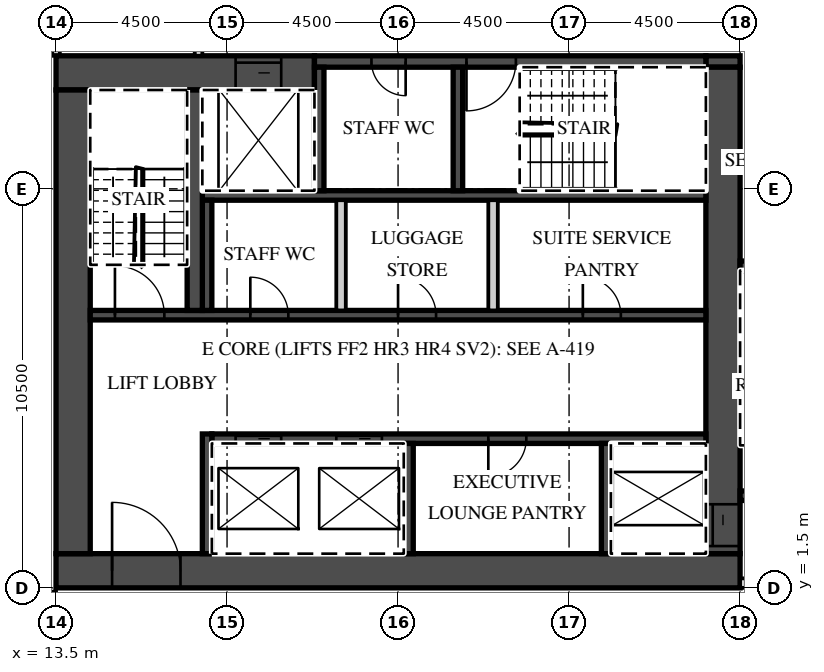
"""IFC4 building model, lengths in metres.
Left out: names, types, materials, properties, quantities, classifications, styles, units other than length and angle.
Written with IfcOpenShell. Run it as: python <this file> out.ifc"""

import sys

from ifc_helpers import new_model, si_unit, direction, frame, frame_2d, origin, place, context, subcontext, project, spatial, rectangle, extrude, element, fill, save


model = new_model("IFC4")
c1 = context("Model", 3, precision=1e-05, world=origin(), true_north=direction((0.0, 1.0)))
c2 = subcontext(c1, "Body", "Model", "MODEL_VIEW")
j1 = project(units=[si_unit("LENGTHUNIT", "METRE"), si_unit("PLANEANGLEUNIT", "RADIAN")], contexts=[c1])
p1 = place(None, origin())
s1 = spatial("IfcSite", under=j1, at=p1, CompositionType="ELEMENT")
p2 = place(p1, origin())
s2 = spatial("IfcBuilding", under=s1, at=p2, CompositionType="ELEMENT")
p3 = place(p2, frame((0.0, 0.0, 304.8)))
s3 = spatial("IfcBuildingStorey", under=s2, at=p3, CompositionType="ELEMENT", Elevation=304.8)
p4 = place(p3, frame((13.5, 15.5, 0.0), z_axis=(0.0, 0.0, 1.0), x_axis=(0.0, 1.0, 0.0)))
e1 = element("IfcWall", 1, at=p4, inside=s3, PredefinedType="PARTITIONING", context=c2, shape_type="SweptSolid", body=[
    extrude(rectangle(XDim=4.985, YDim=0.2, at=frame_2d((2.493, 0.0))), origin(), (0.0, 0.0, 1.0), 2.9),
])
p5 = place(p3, frame((-39.909, 1.3, 0.0), z_axis=(0.0, 0.0, 1.0), x_axis=(1.0, 0.0, 0.0)))
e2 = element("IfcWall", 2, at=p5, inside=s3, PredefinedType="PARTITIONING", context=c2, shape_type="SweptSolid", body=[
    extrude(rectangle(XDim=53.409, YDim=0.2, at=frame_2d((26.705, 0.0))), origin(), (0.0, 0.0, 1.0), 2.9),
])
p6 = place(p5, frame((0.15, 0.0, 0.0)))
e3 = element("IfcOpeningElement", 3, at=p6, cuts=e2, PredefinedType="OPENING", context=c2, shape_type="SweptSolid", body=[
    extrude(rectangle(XDim=0.9, YDim=2.1, at=frame_2d((0.45, 1.05))), frame((0.0, 0.11, 0.0), z_axis=(0.0, -1.0, 0.0), x_axis=(1.0, 0.0, 0.0)), (0.0, 0.0, 1.0), 0.22),
])
p7 = place(p5, frame((9.271, 0.0, 0.0)))
e4 = element("IfcOpeningElement", 4, at=p7, cuts=e2, PredefinedType="OPENING", context=c2, shape_type="SweptSolid", body=[
    extrude(rectangle(XDim=1.2, YDim=2.1, at=frame_2d((0.6, 1.05))), frame((0.0, 0.11, 0.0), z_axis=(0.0, -1.0, 0.0), x_axis=(1.0, 0.0, 0.0)), (0.0, 0.0, 1.0), 0.22),
])
p8 = place(p5, frame((13.484, 0.0, 0.0)))
e5 = element("IfcOpeningElement", 5, at=p8, cuts=e2, PredefinedType="OPENING", context=c2, shape_type="SweptSolid", body=[
    extrude(rectangle(XDim=1.0, YDim=2.1, at=frame_2d((0.5, 1.05))), frame((0.0, 0.11, 0.0), z_axis=(0.0, -1.0, 0.0), x_axis=(1.0, 0.0, 0.0)), (0.0, 0.0, 1.0), 0.22),
])
p9 = place(p5, frame((17.959, 0.0, 0.0)))
e6 = element("IfcOpeningElement", 6, at=p9, cuts=e2, PredefinedType="OPENING", context=c2, shape_type="SweptSolid", body=[
    extrude(rectangle(XDim=1.0, YDim=2.1, at=frame_2d((0.5, 1.05))), frame((0.0, 0.11, 0.0), z_axis=(0.0, -1.0, 0.0), x_axis=(1.0, 0.0, 0.0)), (0.0, 0.0, 1.0), 0.22),
])
p10 = place(p5, frame((24.859, 0.0, 0.0)))
e7 = element("IfcOpeningElement", 7, at=p10, cuts=e2, PredefinedType="OPENING", context=c2, shape_type="SweptSolid", body=[
    extrude(rectangle(XDim=1.0, YDim=2.1, at=frame_2d((0.5, 1.05))), frame((0.0, 0.11, 0.0), z_axis=(0.0, -1.0, 0.0), x_axis=(1.0, 0.0, 0.0)), (0.0, 0.0, 1.0), 0.22),
])
p11 = place(p5, frame((29.334, 0.0, 0.0)))
e8 = element("IfcOpeningElement", 8, at=p11, cuts=e2, PredefinedType="OPENING", context=c2, shape_type="SweptSolid", body=[
    extrude(rectangle(XDim=1.0, YDim=2.1, at=frame_2d((0.5, 1.05))), frame((0.0, 0.11, 0.0), z_axis=(0.0, -1.0, 0.0), x_axis=(1.0, 0.0, 0.0)), (0.0, 0.0, 1.0), 0.22),
])
p12 = place(p5, frame((36.271, 0.0, 0.0)))
e9 = element("IfcOpeningElement", 9, at=p12, cuts=e2, PredefinedType="OPENING", context=c2, shape_type="SweptSolid", body=[
    extrude(rectangle(XDim=1.2, YDim=2.1, at=frame_2d((0.6, 1.05))), frame((0.0, 0.11, 0.0), z_axis=(0.0, -1.0, 0.0), x_axis=(1.0, 0.0, 0.0)), (0.0, 0.0, 1.0), 0.22),
])
p13 = place(p5, frame((40.484, 0.0, 0.0)))
e10 = element("IfcOpeningElement", 10, at=p13, cuts=e2, PredefinedType="OPENING", context=c2, shape_type="SweptSolid", body=[
    extrude(rectangle(XDim=1.0, YDim=2.1, at=frame_2d((0.5, 1.05))), frame((0.0, 0.11, 0.0), z_axis=(0.0, -1.0, 0.0), x_axis=(1.0, 0.0, 0.0)), (0.0, 0.0, 1.0), 0.22),
])
p14 = place(p5, frame((47.334, 0.0, 0.0)))
e11 = element("IfcOpeningElement", 11, at=p14, cuts=e2, PredefinedType="OPENING", context=c2, shape_type="SweptSolid", body=[
    extrude(rectangle(XDim=1.0, YDim=2.1, at=frame_2d((0.5, 1.05))), frame((0.0, 0.11, 0.0), z_axis=(0.0, -1.0, 0.0), x_axis=(1.0, 0.0, 0.0)), (0.0, 0.0, 1.0), 0.22),
])
p15 = place(p5, frame((51.834, 0.0, 0.0)))
e12 = element("IfcOpeningElement", 12, at=p15, cuts=e2, PredefinedType="OPENING", context=c2, shape_type="SweptSolid", body=[
    extrude(rectangle(XDim=1.0, YDim=2.1, at=frame_2d((0.5, 1.05))), frame((0.0, 0.11, 0.0), z_axis=(0.0, -1.0, 0.0), x_axis=(1.0, 0.0, 0.0)), (0.0, 0.0, 1.0), 0.22),
])
p16 = place(p3, frame((13.5, 1.95, 0.0), z_axis=(0.0, 0.0, 1.0), x_axis=(1.0, 0.0, 0.0)))
e13 = element("IfcWall", 13, at=p16, inside=s3, PredefinedType="SHEAR", context=c2, shape_type="SweptSolid", body=[
    extrude(rectangle(XDim=18.0, YDim=0.9, at=frame_2d((9.0, 0.0))), origin(), (0.0, 0.0, 1.0), 2.9),
])
p17 = place(p16, frame((1.475, 0.0, 0.0)))
e14 = element("IfcOpeningElement", 14, at=p17, cuts=e13, PredefinedType="OPENING", context=c2, shape_type="SweptSolid", body=[
    extrude(rectangle(XDim=1.8, YDim=2.1, at=frame_2d((0.9, 1.05))), frame((0.0, 0.46, 0.0), z_axis=(0.0, -1.0, 0.0), x_axis=(1.0, 0.0, 0.0)), (0.0, 0.0, 1.0), 0.92),
])
p18 = place(p3, frame((13.5, 15.05, 0.0), z_axis=(0.0, 0.0, 1.0), x_axis=(1.0, 0.0, 0.0)))
e15 = element("IfcWall", 15, at=p18, inside=s3, PredefinedType="SHEAR", context=c2, shape_type="SweptSolid", body=[
    extrude(rectangle(XDim=6.8, YDim=0.9, at=frame_2d((3.4, 0.0))), origin(), (0.0, 0.0, 1.0), 2.9),
])
p19 = place(p18, frame((4.725, 0.0, 0.0)))
e16 = element("IfcOpeningElement", 16, at=p19, cuts=e15, PredefinedType="OPENING", context=c2, shape_type="SweptSolid", body=[
    extrude(rectangle(XDim=1.2, YDim=2.1, at=frame_2d((0.6, 1.05))), frame((0.0, 0.46, 0.0), z_axis=(0.0, -1.0, 0.0), x_axis=(1.0, 0.0, 0.0)), (0.0, 0.0, 1.0), 0.92),
])
p20 = place(p3, frame((30.6, 15.35, 0.0), z_axis=(0.0, 0.0, 1.0), x_axis=(1.0, 0.0, 0.0)))
e17 = element("IfcWall", 17, at=p20, inside=s3, PredefinedType="SHEAR", context=c2, shape_type="SweptSolid", body=[
    extrude(rectangle(XDim=0.9, YDim=0.3, at=frame_2d((0.45, 0.0))), origin(), (0.0, 0.0, 1.0), 2.9),
])
p21 = place(p3, frame((20.3, 15.35, 0.0), z_axis=(0.0, 0.0, 1.0), x_axis=(1.0, 0.0, 0.0)))
e18 = element("IfcWall", 18, at=p21, inside=s3, PredefinedType="SHEAR", context=c2, shape_type="SweptSolid", body=[
    extrude(rectangle(XDim=10.3, YDim=0.3, at=frame_2d((5.15, 0.0))), origin(), (0.0, 0.0, 1.0), 2.9),
])
p22 = place(p21, frame((4.0, 0.0, 0.0)))
e19 = element("IfcOpeningElement", 19, at=p22, cuts=e18, PredefinedType="OPENING", context=c2, shape_type="SweptSolid", body=[
    extrude(rectangle(XDim=1.3, YDim=2.1, at=frame_2d((0.65, 1.05))), frame((0.0, 0.16, 0.0), z_axis=(0.0, -1.0, 0.0), x_axis=(1.0, 0.0, 0.0)), (0.0, 0.0, 1.0), 0.32),
])
p23 = place(p21, frame((1.5, 0.0, 0.0)))
e20 = element("IfcOpeningElement", 20, at=p23, cuts=e18, PredefinedType="OPENING", context=c2, shape_type="SweptSolid", body=[
    extrude(rectangle(XDim=0.9, YDim=2.1, at=frame_2d((0.45, 1.05))), frame((0.0, 0.16, 0.0), z_axis=(0.0, -1.0, 0.0), x_axis=(1.0, 0.0, 0.0)), (0.0, 0.0, 1.0), 0.32),
])
p24 = place(p3, frame((31.05, 2.4, 0.0), z_axis=(0.0, 0.0, 1.0), x_axis=(0.0, 1.0, 0.0)))
e21 = element("IfcWall", 21, at=p24, inside=s3, PredefinedType="SHEAR", context=c2, shape_type="SweptSolid", body=[
    extrude(rectangle(XDim=12.8, YDim=0.9, at=frame_2d((6.4, 0.0))), origin(), (0.0, 0.0, 1.0), 2.9),
])
p25 = place(p24, frame((0.2, 0.0, 0.0)))
e22 = element("IfcOpeningElement", 22, at=p25, cuts=e21, PredefinedType="OPENING", context=c2, shape_type="SweptSolid", body=[
    extrude(rectangle(XDim=1.1, YDim=2.1, at=frame_2d((0.55, 1.05))), frame((0.0, 0.46, 0.0), z_axis=(0.0, -1.0, 0.0), x_axis=(1.0, 0.0, 0.0)), (0.0, 0.0, 1.0), 0.92),
])
p26 = place(p3, frame((13.95, 2.4, 0.0), z_axis=(0.0, 0.0, 1.0), x_axis=(0.0, 1.0, 0.0)))
e23 = element("IfcWall", 23, at=p26, inside=s3, PredefinedType="SHEAR", context=c2, shape_type="SweptSolid", body=[
    extrude(rectangle(XDim=12.2, YDim=0.9, at=frame_2d((6.1, 0.0))), origin(), (0.0, 0.0, 1.0), 2.9),
])
p27 = place(p3, frame((17.6, 5.425, 0.0), z_axis=(0.0, 0.0, 1.0), x_axis=(1.0, 0.0, 0.0)))
e24 = element("IfcWall", 24, at=p27, inside=s3, PredefinedType="SHEAR", context=c2, shape_type="SweptSolid", body=[
    extrude(rectangle(XDim=13.0, YDim=0.25, at=frame_2d((6.5, 0.0))), origin(), (0.0, 0.0, 1.0), 2.9),
])
p28 = place(p27, frame((3.275, 0.0, 0.0)))
e25 = element("IfcOpeningElement", 25, at=p28, cuts=e24, PredefinedType="OPENING", context=c2, shape_type="SweptSolid", body=[
    extrude(rectangle(XDim=1.2, YDim=2.1, at=frame_2d((0.6, 1.05))), frame((0.0, 0.135, 0.0), z_axis=(0.0, -1.0, 0.0), x_axis=(1.0, 0.0, 0.0)), (0.0, 0.0, 1.0), 0.27),
])
p29 = place(p27, frame((0.625, 0.0, 0.0)))
e26 = element("IfcOpeningElement", 26, at=p29, cuts=e24, PredefinedType="OPENING", context=c2, shape_type="SweptSolid", body=[
    extrude(rectangle(XDim=1.2, YDim=2.1, at=frame_2d((0.6, 1.05))), frame((0.0, 0.135, 0.0), z_axis=(0.0, -1.0, 0.0), x_axis=(1.0, 0.0, 0.0)), (0.0, 0.0, 1.0), 0.27),
])
p30 = place(p27, frame((7.275, 0.0, 0.0)))
e27 = element("IfcOpeningElement", 27, at=p30, cuts=e24, PredefinedType="OPENING", context=c2, shape_type="SweptSolid", body=[
    extrude(rectangle(XDim=1.0, YDim=2.1, at=frame_2d((0.5, 1.05))), frame((0.0, 0.135, 0.0), z_axis=(0.0, -1.0, 0.0), x_axis=(1.0, 0.0, 0.0)), (0.0, 0.0, 1.0), 0.27),
])
p31 = place(p3, frame((17.475, 2.4, 0.0), z_axis=(0.0, 0.0, 1.0), x_axis=(0.0, 1.0, 0.0)))
e28 = element("IfcWall", 28, at=p31, inside=s3, PredefinedType="SHEAR", context=c2, shape_type="SweptSolid", body=[
    extrude(rectangle(XDim=3.15, YDim=0.25, at=frame_2d((1.575, 0.0))), origin(), (0.0, 0.0, 1.0), 2.9),
])
for number, where, z_axis, x_axis in (
    (29, (27.975, 2.4, 0.0), (0.0, 0.0, 1.0), (0.0, 1.0, 0.0)),
    (30, (22.775, 2.4, 0.0), (0.0, 0.0, 1.0), (0.0, 1.0, 0.0)),
):
    element("IfcWall", number, at=place(p3, frame(where, z_axis=z_axis, x_axis=x_axis)), inside=s3, PredefinedType="SHEAR", context=c2, shape_type="SweptSolid", body=[
        extrude(rectangle(XDim=2.9, YDim=0.25, at=frame_2d((1.45, 0.0))), origin(), (0.0, 0.0, 1.0), 2.9),
    ])
p32 = place(p3, frame((14.4, 8.675, 0.0), z_axis=(0.0, 0.0, 1.0), x_axis=(1.0, 0.0, 0.0)))
e31 = element("IfcWall", 31, at=p32, inside=s3, PredefinedType="SHEAR", context=c2, shape_type="SweptSolid", body=[
    extrude(rectangle(XDim=16.2, YDim=0.25, at=frame_2d((8.1, 0.0))), origin(), (0.0, 0.0, 1.0), 2.9),
])
p33 = place(p32, frame((0.65, 0.0, 0.0)))
e32 = element("IfcOpeningElement", 32, at=p33, cuts=e31, PredefinedType="OPENING", context=c2, shape_type="SweptSolid", body=[
    extrude(rectangle(XDim=1.3, YDim=2.1, at=frame_2d((0.65, 1.05))), frame((0.0, 0.135, 0.0), z_axis=(0.0, -1.0, 0.0), x_axis=(1.0, 0.0, 0.0)), (0.0, 0.0, 1.0), 0.27),
])
p34 = place(p32, frame((12.962, 0.0, 0.0)))
e33 = element("IfcOpeningElement", 33, at=p34, cuts=e31, PredefinedType="OPENING", context=c2, shape_type="SweptSolid", body=[
    extrude(rectangle(XDim=1.0, YDim=2.1, at=frame_2d((0.5, 1.05))), frame((0.0, 0.135, 0.0), z_axis=(0.0, -1.0, 0.0), x_axis=(1.0, 0.0, 0.0)), (0.0, 0.0, 1.0), 0.27),
])
p35 = place(p32, frame((8.1, 0.0, 0.0)))
e34 = element("IfcOpeningElement", 34, at=p35, cuts=e31, PredefinedType="OPENING", context=c2, shape_type="SweptSolid", body=[
    extrude(rectangle(XDim=1.0, YDim=2.1, at=frame_2d((0.5, 1.05))), frame((0.0, 0.135, 0.0), z_axis=(0.0, -1.0, 0.0), x_axis=(1.0, 0.0, 0.0)), (0.0, 0.0, 1.0), 0.27),
])
p36 = place(p32, frame((4.212, 0.0, 0.0)))
e35 = element("IfcOpeningElement", 35, at=p36, cuts=e31, PredefinedType="OPENING", context=c2, shape_type="SweptSolid", body=[
    extrude(rectangle(XDim=1.0, YDim=2.1, at=frame_2d((0.5, 1.05))), frame((0.0, 0.135, 0.0), z_axis=(0.0, -1.0, 0.0), x_axis=(1.0, 0.0, 0.0)), (0.0, 0.0, 1.0), 0.27),
])
p37 = place(p3, frame((17.35, 11.825, 0.0), z_axis=(0.0, 0.0, 1.0), x_axis=(1.0, 0.0, 0.0)))
e36 = element("IfcWall", 36, at=p37, inside=s3, PredefinedType="SHEAR", context=c2, shape_type="SweptSolid", body=[
    extrude(rectangle(XDim=13.25, YDim=0.25, at=frame_2d((6.625, 0.0))), origin(), (0.0, 0.0, 1.0), 2.9),
])
p38 = place(p3, frame((17.475, 8.8, 0.0), z_axis=(0.0, 0.0, 1.0), x_axis=(0.0, 1.0, 0.0)))
e37 = element("IfcWall", 37, at=p38, inside=s3, PredefinedType="SHEAR", context=c2, shape_type="SweptSolid", body=[
    extrude(rectangle(XDim=2.9, YDim=0.25, at=frame_2d((1.45, 0.0))), origin(), (0.0, 0.0, 1.0), 2.9),
])
for number, where, z_axis, x_axis in (
    (38, (25.0, 8.8, 0.0), (0.0, 0.0, 1.0), (0.0, 1.0, 0.0)),
    (39, (21.0, 8.8, 0.0), (0.0, 0.0, 1.0), (0.0, 1.0, 0.0)),
):
    element("IfcWall", number, at=place(p3, frame(where, z_axis=z_axis, x_axis=x_axis)), inside=s3, PredefinedType="PARTITIONING", context=c2, shape_type="SweptSolid", body=[
        extrude(rectangle(XDim=2.9, YDim=0.25, at=frame_2d((1.45, 0.0))), origin(), (0.0, 0.0, 1.0), 2.9),
    ])
p39 = place(p3, frame((17.15, 8.8, 0.0), z_axis=(0.0, 0.0, 1.0), x_axis=(0.0, 1.0, 0.0)))
e40 = element("IfcWall", 40, at=p39, inside=s3, PredefinedType="SHEAR", context=c2, shape_type="SweptSolid", body=[
    extrude(rectangle(XDim=5.8, YDim=0.4, at=frame_2d((2.9, 0.0))), origin(), (0.0, 0.0, 1.0), 2.9),
])
for number, where, z_axis, x_axis in (
    (41, (20.425, 11.95, 0.0), (0.0, 0.0, 1.0), (0.0, 1.0, 0.0)),
    (42, (24.075, 11.95, 0.0), (0.0, 0.0, 1.0), (0.0, 1.0, 0.0)),
):
    element("IfcWall", number, at=place(p3, frame(where, z_axis=z_axis, x_axis=x_axis)), inside=s3, PredefinedType="SHEAR", context=c2, shape_type="SweptSolid", body=[
        extrude(rectangle(XDim=3.25, YDim=0.25, at=frame_2d((1.625, 0.0))), origin(), (0.0, 0.0, 1.0), 2.9),
    ])
p40 = place(p3, frame((31.5, 1.625, 0.0), z_axis=(0.0, 0.0, 1.0), x_axis=(1.0, 0.0, 0.0)))
e43 = element("IfcWall", 43, at=p40, inside=s3, PredefinedType="PARTITIONING", context=c2, shape_type="SweptSolid", body=[
    extrude(rectangle(XDim=5.012, YDim=0.25, at=frame_2d((2.506, 0.0))), origin(), (0.0, 0.0, 1.0), 2.9),
])
p41 = place(p40, frame((0.625, 0.0, 0.0)))
e44 = element("IfcOpeningElement", 44, at=p41, cuts=e43, PredefinedType="OPENING", context=c2, shape_type="SweptSolid", body=[
    extrude(rectangle(XDim=1.3, YDim=2.1, at=frame_2d((0.65, 1.05))), frame((0.0, 0.135, 0.0), z_axis=(0.0, -1.0, 0.0), x_axis=(1.0, 0.0, 0.0)), (0.0, 0.0, 1.0), 0.27),
])
p42 = place(p40, frame((3.25, 0.0, 0.0)))
e45 = element("IfcOpeningElement", 45, at=p42, cuts=e43, PredefinedType="OPENING", context=c2, shape_type="SweptSolid", body=[
    extrude(rectangle(XDim=1.1, YDim=2.1, at=frame_2d((0.55, 1.05))), frame((0.0, 0.135, 0.0), z_axis=(0.0, -1.0, 0.0), x_axis=(1.0, 0.0, 0.0)), (0.0, 0.0, 1.0), 0.27),
])
p43 = place(p3, frame((31.5, 3.925, 0.0), z_axis=(0.0, 0.0, 1.0), x_axis=(1.0, 0.0, 0.0)))
e46 = element("IfcWall", 46, at=p43, inside=s3, PredefinedType="SHEAR", context=c2, shape_type="SweptSolid", body=[
    extrude(rectangle(XDim=2.55, YDim=0.25, at=frame_2d((1.275, 0.0))), origin(), (0.0, 0.0, 1.0), 2.9),
])
p44 = place(p43, frame((0.625, 0.0, 0.0)))
e47 = element("IfcOpeningElement", 47, at=p44, cuts=e46, PredefinedType="OPENING", context=c2, shape_type="SweptSolid", body=[
    extrude(rectangle(XDim=1.3, YDim=2.1, at=frame_2d((0.65, 1.05))), frame((0.0, 0.135, 0.0), z_axis=(0.0, -1.0, 0.0), x_axis=(1.0, 0.0, 0.0)), (0.0, 0.0, 1.0), 0.27),
])
p45 = place(p3, frame((31.5, 9.975, 0.0), z_axis=(0.0, 0.0, 1.0), x_axis=(1.0, 0.0, 0.0)))
e48 = element("IfcWall", 48, at=p45, inside=s3, PredefinedType="SHEAR", context=c2, shape_type="SweptSolid", body=[
    extrude(rectangle(XDim=2.55, YDim=0.25, at=frame_2d((1.275, 0.0))), origin(), (0.0, 0.0, 1.0), 2.9),
])
p46 = place(p3, frame((17.25, 15.5, 0.0), z_axis=(0.0, 0.0, 1.0), x_axis=(0.0, 1.0, 0.0)))
e49 = element("IfcWall", 49, at=p46, inside=s3, PredefinedType="PARTITIONING", context=c2, shape_type="SweptSolid", body=[
    extrude(rectangle(XDim=2.2, YDim=0.2, at=frame_2d((1.1, 0.0))), origin(), (0.0, 0.0, 1.0), 2.9),
])
p47 = place(p28, origin())
e50 = element("IfcDoor", 50, at=p47, inside=s3, OperationType="SLIDING_TO_RIGHT", PredefinedType="DOOR", context=c2, shape_type="SweptSolid", body=[
    extrude(rectangle(XDim=1.2, YDim=2.1, at=frame_2d((0.6, 1.05))), frame((0.0, 0.025, 0.0), z_axis=(0.0, -1.0, 0.0), x_axis=(1.0, 0.0, 0.0)), (0.0, 0.0, 1.0), 0.05),
])
fill(e25, e50)
p48 = place(p29, origin())
e51 = element("IfcDoor", 51, at=p48, inside=s3, OperationType="SLIDING_TO_LEFT", PredefinedType="DOOR", context=c2, shape_type="SweptSolid", body=[
    extrude(rectangle(XDim=1.2, YDim=2.1, at=frame_2d((0.6, 1.05))), frame((0.0, 0.025, 0.0), z_axis=(0.0, -1.0, 0.0), x_axis=(1.0, 0.0, 0.0)), (0.0, 0.0, 1.0), 0.05),
])
fill(e26, e51)
p49 = place(p19, origin())
e52 = element("IfcDoor", 52, at=p49, inside=s3, OperationType="SLIDING_TO_LEFT", PredefinedType="DOOR", context=c2, shape_type="SweptSolid", body=[
    extrude(rectangle(XDim=1.2, YDim=2.1, at=frame_2d((0.6, 1.05))), frame((0.0, 0.025, 0.0), z_axis=(0.0, -1.0, 0.0), x_axis=(1.0, 0.0, 0.0)), (0.0, 0.0, 1.0), 0.05),
])
fill(e16, e52)
p50 = place(p25, origin())
e53 = element("IfcDoor", 53, at=p50, inside=s3, OperationType="SLIDING_TO_LEFT", PredefinedType="DOOR", context=c2, shape_type="SweptSolid", body=[
    extrude(rectangle(XDim=1.1, YDim=2.1, at=frame_2d((0.55, 1.05))), frame((0.0, 0.025, 0.0), z_axis=(0.0, -1.0, 0.0), x_axis=(1.0, 0.0, 0.0)), (0.0, 0.0, 1.0), 0.05),
])
fill(e22, e53)
p51 = place(p17, origin())
e54 = element("IfcDoor", 54, at=p51, inside=s3, OperationType="DOUBLE_DOOR_DOUBLE_SWING", PredefinedType="DOOR", context=c2, shape_type="SweptSolid", body=[
    extrude(rectangle(XDim=1.8, YDim=2.1, at=frame_2d((0.9, 1.05))), frame((0.0, 0.025, 0.0), z_axis=(0.0, -1.0, 0.0), x_axis=(1.0, 0.0, 0.0)), (0.0, 0.0, 1.0), 0.05),
])
fill(e14, e54)
p52 = place(p33, origin())
e55 = element("IfcDoor", 55, at=p52, inside=s3, OperationType="SINGLE_SWING_LEFT", PredefinedType="DOOR", context=c2, shape_type="SweptSolid", body=[
    extrude(rectangle(XDim=1.3, YDim=2.1, at=frame_2d((0.65, 1.05))), frame((0.0, 0.025, 0.0), z_axis=(0.0, -1.0, 0.0), x_axis=(1.0, 0.0, 0.0)), (0.0, 0.0, 1.0), 0.05),
])
fill(e32, e55)
p53 = place(p22, origin())
e56 = element("IfcDoor", 56, at=p53, inside=s3, OperationType="SINGLE_SWING_LEFT", PredefinedType="DOOR", context=c2, shape_type="SweptSolid", body=[
    extrude(rectangle(XDim=1.3, YDim=2.1, at=frame_2d((0.65, 1.05))), frame((0.0, 0.025, 0.0), z_axis=(0.0, -1.0, 0.0), x_axis=(1.0, 0.0, 0.0)), (0.0, 0.0, 1.0), 0.05),
])
fill(e19, e56)
p54 = place(p23, origin())
e57 = element("IfcDoor", 57, at=p54, inside=s3, OperationType="SINGLE_SWING_RIGHT", PredefinedType="DOOR", context=c2, shape_type="SweptSolid", body=[
    extrude(rectangle(XDim=0.9, YDim=2.1, at=frame_2d((0.45, 1.05))), frame((0.0, 0.025, 0.0), z_axis=(0.0, -1.0, 0.0), x_axis=(1.0, 0.0, 0.0)), (0.0, 0.0, 1.0), 0.05),
])
fill(e20, e57)
p55 = place(p34, origin())
e58 = element("IfcDoor", 58, at=p55, inside=s3, OperationType="SINGLE_SWING_LEFT", PredefinedType="DOOR", context=c2, shape_type="SweptSolid", body=[
    extrude(rectangle(XDim=1.0, YDim=2.1, at=frame_2d((0.5, 1.05))), frame((0.0, 0.025, 0.0), z_axis=(0.0, -1.0, 0.0), x_axis=(1.0, 0.0, 0.0)), (0.0, 0.0, 1.0), 0.05),
])
fill(e33, e58)
p56 = place(p35, origin())
e59 = element("IfcDoor", 59, at=p56, inside=s3, OperationType="SINGLE_SWING_LEFT", PredefinedType="DOOR", context=c2, shape_type="SweptSolid", body=[
    extrude(rectangle(XDim=1.0, YDim=2.1, at=frame_2d((0.5, 1.05))), frame((0.0, 0.025, 0.0), z_axis=(0.0, -1.0, 0.0), x_axis=(1.0, 0.0, 0.0)), (0.0, 0.0, 1.0), 0.05),
])
fill(e34, e59)
p57 = place(p36, origin())
e60 = element("IfcDoor", 60, at=p57, inside=s3, OperationType="SINGLE_SWING_LEFT", PredefinedType="DOOR", context=c2, shape_type="SweptSolid", body=[
    extrude(rectangle(XDim=1.0, YDim=2.1, at=frame_2d((0.5, 1.05))), frame((0.0, 0.025, 0.0), z_axis=(0.0, -1.0, 0.0), x_axis=(1.0, 0.0, 0.0)), (0.0, 0.0, 1.0), 0.05),
])
fill(e35, e60)
p58 = place(p30, origin())
e61 = element("IfcDoor", 61, at=p58, inside=s3, OperationType="SINGLE_SWING_LEFT", PredefinedType="DOOR", context=c2, shape_type="SweptSolid", body=[
    extrude(rectangle(XDim=1.0, YDim=2.1, at=frame_2d((0.5, 1.05))), frame((0.0, 0.025, 0.0), z_axis=(0.0, -1.0, 0.0), x_axis=(1.0, 0.0, 0.0)), (0.0, 0.0, 1.0), 0.05),
])
fill(e27, e61)
save(model, sys.argv[1])
